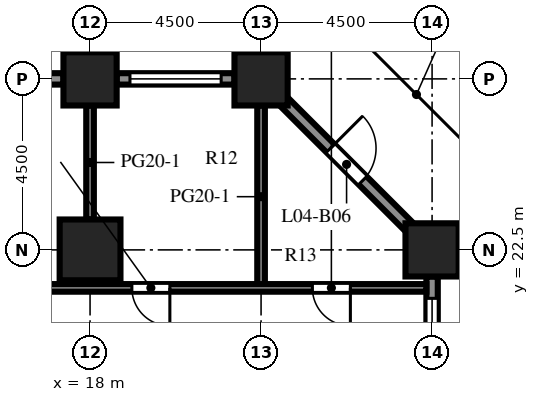
"""IFC4 building model, lengths in metres.
Left out: names, types, materials, properties, quantities, classifications, styles, units other than length and angle.
Written with IfcOpenShell. Run it as: python <this file> out.ifc"""

import sys

from ifc_helpers import new_model, si_unit, direction, frame, frame_2d, origin, origin_2d, place, context, subcontext, project, spatial, rectangle, extrude, element, fill, save


model = new_model("IFC4")
c1 = context("Model", 3, precision=1e-05, world=origin(), true_north=direction((0.0, 1.0)))
c2 = subcontext(c1, "Body", "Model", "MODEL_VIEW")
j1 = project(units=[si_unit("LENGTHUNIT", "METRE"), si_unit("PLANEANGLEUNIT", "RADIAN")], contexts=[c1])
p1 = place(None, origin())
s1 = spatial("IfcSite", under=j1, at=p1, CompositionType="ELEMENT")
p2 = place(p1, origin())
s2 = spatial("IfcBuilding", under=s1, at=p2, CompositionType="ELEMENT")
p3 = place(p2, frame((0.0, 0.0, 19.5)))
s3 = spatial("IfcBuildingStorey", under=s2, at=p3, CompositionType="ELEMENT", Elevation=19.5)
for number, where, z_axis, x_axis in (
    (1, (18.0, 27.0, 0.0), (0.0, 0.0, 1.0), (1.0, 0.0, 0.0)),
    (2, (22.5, 27.0, 0.0), (0.0, 0.0, 1.0), (1.0, 0.0, 0.0)),
    (3, (27.0, 22.5, 0.0), (0.0, 0.0, 1.0), (1.0, 0.0, 0.0)),
):
    element("IfcColumn", number, at=place(p3, frame(where, z_axis=z_axis, x_axis=x_axis)), inside=s3, PredefinedType="COLUMN", context=c2, shape_type="SweptSolid", body=[
        extrude(rectangle(XDim=1.4, YDim=1.4, at=origin_2d()), origin(), (0.0, 0.0, 1.0), 4.1),
    ])
p4 = place(p3, frame((18.0, 22.5, 0.0), z_axis=(0.0, 0.0, 1.0), x_axis=(1.0, 0.0, 0.0)))
e4 = element("IfcColumn", 4, at=p4, inside=s3, PredefinedType="COLUMN", context=c2, shape_type="SweptSolid", body=[
    extrude(rectangle(XDim=1.6, YDim=1.6, at=origin_2d()), origin(), (0.0, 0.0, 1.0), 4.1),
])
p5 = place(p3, frame((27.0, 21.8, 0.0), z_axis=(0.0, 0.0, 1.0), x_axis=(0.0, -1.0, 0.0)))
e5 = element("IfcWall", 5, at=p5, inside=s3, PredefinedType="SOLIDWALL", context=c2, shape_type="SweptSolid", body=[
    extrude(rectangle(XDim=3.1, YDim=0.3, at=frame_2d((1.55, 0.0))), origin(), (0.0, 0.0, 1.0), 2.75),
])
p6 = place(p5, frame((0.575, 0.0, 0.8)))
e6 = element("IfcOpeningElement", 6, at=p6, cuts=e5, PredefinedType="OPENING", context=c2, shape_type="SweptSolid", body=[
    extrude(rectangle(XDim=2.4, YDim=1.7, at=frame_2d((1.2, 0.85))), frame((0.0, 0.16, 0.0), z_axis=(0.0, -1.0, 0.0), x_axis=(1.0, 0.0, 0.0)), (0.0, 0.0, 1.0), 0.32),
])
p7 = place(p3, frame((23.094, 26.406, 0.0), z_axis=(0.0, 0.0, 1.0), x_axis=(0.707106781187, -0.707106781187, 0.0)))
e7 = element("IfcWall", 7, at=p7, inside=s3, PredefinedType="SOLIDWALL", context=c2, shape_type="SweptSolid", body=[
    extrude(rectangle(XDim=4.684, YDim=0.3, at=frame_2d((2.342, 0.0))), origin(), (0.0, 0.0, 1.0), 2.75),
])
p8 = place(p7, frame((1.742, 0.0, 0.0)))
e8 = element("IfcOpeningElement", 8, at=p8, cuts=e7, PredefinedType="OPENING", context=c2, shape_type="SweptSolid", body=[
    extrude(rectangle(XDim=1.2, YDim=2.2, at=frame_2d((0.6, 1.1))), frame((0.0, 0.16, 0.0), z_axis=(0.0, -1.0, 0.0), x_axis=(1.0, 0.0, 0.0)), (0.0, 0.0, 1.0), 0.32),
])
p9 = place(p3, frame((18.7, 27.0, 0.0), z_axis=(0.0, 0.0, 1.0), x_axis=(1.0, 0.0, 0.0)))
e9 = element("IfcWall", 9, at=p9, inside=s3, PredefinedType="SOLIDWALL", context=c2, shape_type="SweptSolid", body=[
    extrude(rectangle(XDim=3.1, YDim=0.3, at=frame_2d((1.55, 0.0))), origin(), (0.0, 0.0, 1.0), 2.75),
])
p10 = place(p9, frame((0.35, 0.0, 0.8)))
e10 = element("IfcOpeningElement", 10, at=p10, cuts=e9, PredefinedType="OPENING", context=c2, shape_type="SweptSolid", body=[
    extrude(rectangle(XDim=2.4, YDim=1.7, at=frame_2d((1.2, 0.85))), frame((0.0, 0.16, 0.0), z_axis=(0.0, -1.0, 0.0), x_axis=(1.0, 0.0, 0.0)), (0.0, 0.0, 1.0), 0.32),
])
p11 = place(p3, frame((14.2, 27.0, 0.0), z_axis=(0.0, 0.0, 1.0), x_axis=(1.0, 0.0, 0.0)))
e11 = element("IfcWall", 11, at=p11, inside=s3, PredefinedType="SOLIDWALL", context=c2, shape_type="SweptSolid", body=[
    extrude(rectangle(XDim=3.1, YDim=0.3, at=frame_2d((1.55, 0.0))), origin(), (0.0, 0.0, 1.0), 2.75),
])
p12 = place(p11, frame((1.05, 0.0, 0.0)))
e12 = element("IfcOpeningElement", 12, at=p12, cuts=e11, PredefinedType="OPENING", context=c2, shape_type="SweptSolid", body=[
    extrude(rectangle(XDim=1.0, YDim=2.2, at=frame_2d((0.5, 1.1))), frame((0.0, 0.16, 0.0), z_axis=(0.0, -1.0, 0.0), x_axis=(1.0, 0.0, 0.0)), (0.0, 0.0, 1.0), 0.32),
])
p13 = place(p3, frame((18.0, 23.3, 0.0), z_axis=(0.0, 0.0, 1.0), x_axis=(0.0, 1.0, 0.0)))
e13 = element("IfcWall", 13, at=p13, inside=s3, PredefinedType="PARTITIONING", context=c2, shape_type="SweptSolid", body=[
    extrude(rectangle(XDim=3.0, YDim=0.2, at=frame_2d((1.5, 0.0))), origin(), (0.0, 0.0, 1.0), 3.65),
])
p14 = place(p3, frame((22.5, 21.5, 0.0), z_axis=(0.0, 0.0, 1.0), x_axis=(0.0, 1.0, 0.0)))
e14 = element("IfcWall", 14, at=p14, inside=s3, PredefinedType="PARTITIONING", context=c2, shape_type="SweptSolid", body=[
    extrude(rectangle(XDim=4.8, YDim=0.2, at=frame_2d((2.4, 0.0))), origin(), (0.0, 0.0, 1.0), 3.65),
])
p15 = place(p3, frame((-26.85, 21.5, 0.0), z_axis=(0.0, 0.0, 1.0), x_axis=(1.0, 0.0, 0.0)))
e15 = element("IfcWall", 15, at=p15, inside=s3, PredefinedType="PARTITIONING", context=c2, shape_type="SweptSolid", body=[
    extrude(rectangle(XDim=53.7, YDim=0.2, at=frame_2d((26.85, 0.0))), origin(), (0.0, 0.0, 1.0), 3.65),
])
p16 = place(p15, frame((0.95, 0.0, 0.0)))
e16 = element("IfcOpeningElement", 16, at=p16, cuts=e15, PredefinedType="OPENING", context=c2, shape_type="SweptSolid", body=[
    extrude(rectangle(XDim=1.0, YDim=2.1, at=frame_2d((0.5, 1.05))), frame((0.0, 0.11, 0.0), z_axis=(0.0, -1.0, 0.0), x_axis=(1.0, 0.0, 0.0)), (0.0, 0.0, 1.0), 0.22),
])
p17 = place(p15, frame((9.7, 0.0, 0.0)))
e17 = element("IfcOpeningElement", 17, at=p17, cuts=e15, PredefinedType="OPENING", context=c2, shape_type="SweptSolid", body=[
    extrude(rectangle(XDim=1.0, YDim=2.1, at=frame_2d((0.5, 1.05))), frame((0.0, 0.11, 0.0), z_axis=(0.0, -1.0, 0.0), x_axis=(1.0, 0.0, 0.0)), (0.0, 0.0, 1.0), 0.22),
])
p18 = place(p15, frame((15.2, 0.0, 0.0)))
e18 = element("IfcOpeningElement", 18, at=p18, cuts=e15, PredefinedType="OPENING", context=c2, shape_type="SweptSolid", body=[
    extrude(rectangle(XDim=1.0, YDim=2.1, at=frame_2d((0.5, 1.05))), frame((0.0, 0.11, 0.0), z_axis=(0.0, -1.0, 0.0), x_axis=(1.0, 0.0, 0.0)), (0.0, 0.0, 1.0), 0.22),
])
p19 = place(p15, frame((24.95, 0.0, 0.0)))
e19 = element("IfcOpeningElement", 19, at=p19, cuts=e15, PredefinedType="OPENING", context=c2, shape_type="SweptSolid", body=[
    extrude(rectangle(XDim=1.0, YDim=2.1, at=frame_2d((0.5, 1.05))), frame((0.0, 0.11, 0.0), z_axis=(0.0, -1.0, 0.0), x_axis=(1.0, 0.0, 0.0)), (0.0, 0.0, 1.0), 0.22),
])
p20 = place(p15, frame((32.95, 0.0, 0.0)))
e20 = element("IfcOpeningElement", 20, at=p20, cuts=e15, PredefinedType="OPENING", context=c2, shape_type="SweptSolid", body=[
    extrude(rectangle(XDim=1.0, YDim=2.1, at=frame_2d((0.5, 1.05))), frame((0.0, 0.11, 0.0), z_axis=(0.0, -1.0, 0.0), x_axis=(1.0, 0.0, 0.0)), (0.0, 0.0, 1.0), 0.22),
])
p21 = place(p15, frame((38.7, 0.0, 0.0)))
e21 = element("IfcOpeningElement", 21, at=p21, cuts=e15, PredefinedType="OPENING", context=c2, shape_type="SweptSolid", body=[
    extrude(rectangle(XDim=1.0, YDim=2.1, at=frame_2d((0.5, 1.05))), frame((0.0, 0.11, 0.0), z_axis=(0.0, -1.0, 0.0), x_axis=(1.0, 0.0, 0.0)), (0.0, 0.0, 1.0), 0.22),
])
p22 = place(p15, frame((45.95, 0.0, 0.0)))
e22 = element("IfcOpeningElement", 22, at=p22, cuts=e15, PredefinedType="OPENING", context=c2, shape_type="SweptSolid", body=[
    extrude(rectangle(XDim=1.0, YDim=2.1, at=frame_2d((0.5, 1.05))), frame((0.0, 0.11, 0.0), z_axis=(0.0, -1.0, 0.0), x_axis=(1.0, 0.0, 0.0)), (0.0, 0.0, 1.0), 0.22),
])
p23 = place(p15, frame((50.7, 0.0, 0.0)))
e23 = element("IfcOpeningElement", 23, at=p23, cuts=e15, PredefinedType="OPENING", context=c2, shape_type="SweptSolid", body=[
    extrude(rectangle(XDim=1.0, YDim=2.1, at=frame_2d((0.5, 1.05))), frame((0.0, 0.11, 0.0), z_axis=(0.0, -1.0, 0.0), x_axis=(1.0, 0.0, 0.0)), (0.0, 0.0, 1.0), 0.22),
])
p24 = place(p6, origin())
e24 = element("IfcWindow", 24, at=p24, inside=s3, PartitioningType="SINGLE_PANEL", PredefinedType="WINDOW", context=c2, shape_type="SweptSolid", body=[
    extrude(rectangle(XDim=2.4, YDim=1.7, at=frame_2d((1.2, 0.85))), frame((0.0, 0.03, 0.0), z_axis=(0.0, -1.0, 0.0), x_axis=(1.0, 0.0, 0.0)), (0.0, 0.0, 1.0), 0.06),
])
fill(e6, e24)
p25 = place(p8, origin())
e25 = element("IfcDoor", 25, at=p25, inside=s3, OperationType="SINGLE_SWING_LEFT", PredefinedType="DOOR", context=c2, shape_type="SweptSolid", body=[
    extrude(rectangle(XDim=1.2, YDim=2.2, at=frame_2d((0.6, 1.1))), frame((0.0, 0.025, 0.0), z_axis=(0.0, -1.0, 0.0), x_axis=(1.0, 0.0, 0.0)), (0.0, 0.0, 1.0), 0.05),
])
fill(e8, e25)
p26 = place(p10, origin())
e26 = element("IfcWindow", 26, at=p26, inside=s3, PartitioningType="SINGLE_PANEL", PredefinedType="WINDOW", context=c2, shape_type="SweptSolid", body=[
    extrude(rectangle(XDim=2.4, YDim=1.7, at=frame_2d((1.2, 0.85))), frame((0.0, 0.03, 0.0), z_axis=(0.0, -1.0, 0.0), x_axis=(1.0, 0.0, 0.0)), (0.0, 0.0, 1.0), 0.06),
])
fill(e10, e26)
p27 = place(p22, origin())
e27 = element("IfcDoor", 27, at=p27, inside=s3, OperationType="SINGLE_SWING_RIGHT", PredefinedType="DOOR", context=c2, shape_type="SweptSolid", body=[
    extrude(rectangle(XDim=1.0, YDim=2.1, at=frame_2d((0.5, 1.05))), frame((0.0, 0.025, 0.0), z_axis=(0.0, -1.0, 0.0), x_axis=(1.0, 0.0, 0.0)), (0.0, 0.0, 1.0), 0.05),
])
fill(e22, e27)
p28 = place(p23, origin())
e28 = element("IfcDoor", 28, at=p28, inside=s3, OperationType="SINGLE_SWING_RIGHT", PredefinedType="DOOR", context=c2, shape_type="SweptSolid", body=[
    extrude(rectangle(XDim=1.0, YDim=2.1, at=frame_2d((0.5, 1.05))), frame((0.0, 0.025, 0.0), z_axis=(0.0, -1.0, 0.0), x_axis=(1.0, 0.0, 0.0)), (0.0, 0.0, 1.0), 0.05),
])
fill(e23, e28)
save(model, sys.argv[1])
